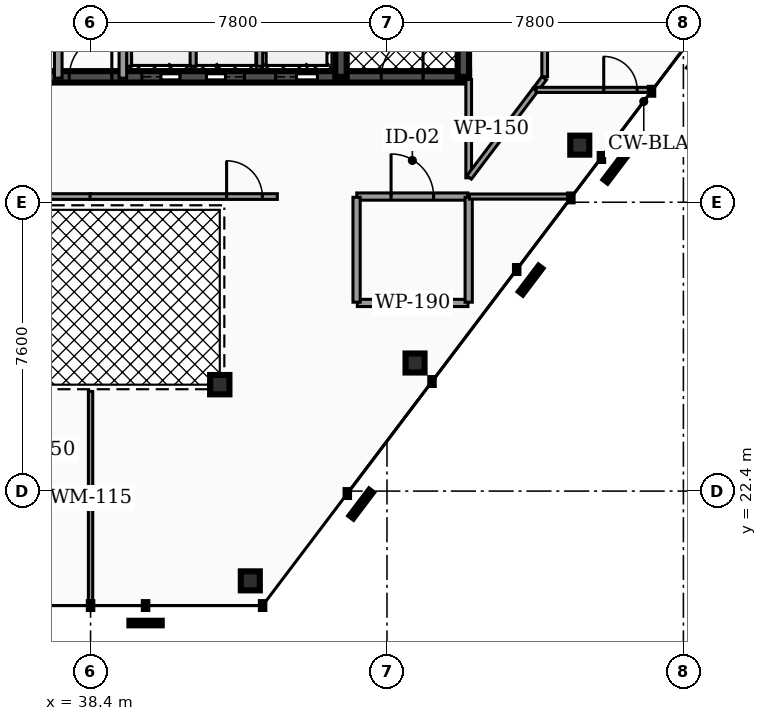
"""IFC4 building model, lengths in metres.
Left out: names, types, materials, properties, quantities, classifications, styles, units other than length and angle.
Written with IfcOpenShell. Run it as: python <this file> out.ifc"""

import sys

from ifc_helpers import new_model, si_unit, direction, frame, frame_2d, origin, origin_2d, place, context, subcontext, project, spatial, rectangle, hollow_rectangle, hollow_circle, extrude, element, fill, save


model = new_model("IFC4")
c1 = context("Model", 3, precision=1e-05, world=origin(), true_north=direction((0.0, 1.0)))
c2 = subcontext(c1, "Body", "Model", "MODEL_VIEW")
j1 = project(units=[si_unit("LENGTHUNIT", "METRE"), si_unit("PLANEANGLEUNIT", "RADIAN")], contexts=[c1])
p1 = place(None, origin())
s1 = spatial("IfcSite", under=j1, at=p1, CompositionType="ELEMENT")
p2 = place(p1, origin())
s2 = spatial("IfcBuilding", under=s1, at=p2, CompositionType="ELEMENT")
p3 = place(p2, frame((0.0, 0.0, 275.4)))
s3 = spatial("IfcBuildingStorey", under=s2, at=p3, CompositionType="ELEMENT", Elevation=275.4)
p4 = place(p3, frame((28.5, 33.3, 0.0), z_axis=(0.0, 0.0, 1.0), x_axis=(1.0, 0.0, 0.0)))
e1 = element("IfcWall", 1, at=p4, inside=s3, PredefinedType="SHEAR", context=c2, shape_type="SweptSolid", body=[
    extrude(rectangle(XDim=19.86, YDim=0.3, at=frame_2d((9.93, 0.0))), origin(), (0.0, 0.0, 1.0), 3.18),
])
p5 = place(p4, frame((3.93, 0.0, 0.0)))
e2 = element("IfcOpeningElement", 2, at=p5, cuts=e1, PredefinedType="OPENING", context=c2, shape_type="SweptSolid", body=[
    extrude(rectangle(XDim=1.1, YDim=2.15, at=frame_2d((0.55, 1.075))), frame((0.0, 0.16, 0.0), z_axis=(0.0, -1.0, 0.0), x_axis=(1.0, 0.0, 0.0)), (0.0, 0.0, 1.0), 0.32),
])
p6 = place(p4, frame((14.77, 0.0, 0.0)))
e3 = element("IfcOpeningElement", 3, at=p6, cuts=e1, PredefinedType="OPENING", context=c2, shape_type="SweptSolid", body=[
    extrude(rectangle(XDim=1.1, YDim=2.15, at=frame_2d((0.55, 1.075))), frame((0.0, 0.16, 0.0), z_axis=(0.0, -1.0, 0.0), x_axis=(1.0, 0.0, 0.0)), (0.0, 0.0, 1.0), 0.32),
])
p7 = place(p4, frame((11.25, 0.0, 0.0)))
e4 = element("IfcOpeningElement", 4, at=p7, cuts=e1, PredefinedType="OPENING", context=c2, shape_type="SweptSolid", body=[
    extrude(rectangle(XDim=1.0, YDim=2.1, at=frame_2d((0.5, 1.05))), frame((0.0, 0.16, 0.0), z_axis=(0.0, -1.0, 0.0), x_axis=(1.0, 0.0, 0.0)), (0.0, 0.0, 1.0), 0.32),
])
p8 = place(p4, frame((12.95, 0.0, 0.0)))
e5 = element("IfcOpeningElement", 5, at=p8, cuts=e1, PredefinedType="OPENING", context=c2, shape_type="SweptSolid", body=[
    extrude(rectangle(XDim=1.0, YDim=2.1, at=frame_2d((0.5, 1.05))), frame((0.0, 0.16, 0.0), z_axis=(0.0, -1.0, 0.0), x_axis=(1.0, 0.0, 0.0)), (0.0, 0.0, 1.0), 0.32),
])
p9 = place(p4, frame((5.85, 0.0, 0.0)))
e6 = element("IfcOpeningElement", 6, at=p9, cuts=e1, PredefinedType="OPENING", context=c2, shape_type="SweptSolid", body=[
    extrude(rectangle(XDim=1.0, YDim=2.1, at=frame_2d((0.5, 1.05))), frame((0.0, 0.16, 0.0), z_axis=(0.0, -1.0, 0.0), x_axis=(1.0, 0.0, 0.0)), (0.0, 0.0, 1.0), 0.32),
])
p10 = place(p4, frame((1.21, 0.0, 0.0)))
e7 = element("IfcOpeningElement", 7, at=p10, cuts=e1, PredefinedType="OPENING", context=c2, shape_type="SweptSolid", body=[
    extrude(rectangle(XDim=1.1, YDim=2.2, at=frame_2d((0.55, 1.1))), frame((0.0, 0.16, 0.0), z_axis=(0.0, -1.0, 0.0), x_axis=(1.0, 0.0, 0.0)), (0.0, 0.0, 1.0), 0.32),
])
p11 = place(p4, frame((9.34, 0.0, 0.0)))
e8 = element("IfcOpeningElement", 8, at=p11, cuts=e1, PredefinedType="OPENING", context=c2, shape_type="SweptSolid", body=[
    extrude(rectangle(XDim=1.12, YDim=2.05, at=frame_2d((0.56, 1.025))), frame((0.0, 0.16, 0.0), z_axis=(0.0, -1.0, 0.0), x_axis=(1.0, 0.0, 0.0)), (0.0, 0.0, 1.0), 0.32),
])
p12 = place(p4, frame((17.55, 0.0, 0.0)))
e9 = element("IfcOpeningElement", 9, at=p12, cuts=e1, PredefinedType="OPENING", context=c2, shape_type="SweptSolid", body=[
    extrude(rectangle(XDim=1.1, YDim=2.2, at=frame_2d((0.55, 1.1))), frame((0.0, 0.16, 0.0), z_axis=(0.0, -1.0, 0.0), x_axis=(1.0, 0.0, 0.0)), (0.0, 0.0, 1.0), 0.32),
])
for number, where, z_axis, x_axis in (
    (10, (44.99, 33.3, 0.0), (0.0, 0.0, 1.0), (0.0, 1.0, 0.0)),
    (11, (48.21, 33.3, 0.0), (0.0, 0.0, 1.0), (0.0, 1.0, 0.0)),
):
    element("IfcWall", number, at=place(p3, frame(where, z_axis=z_axis, x_axis=x_axis)), inside=s3, PredefinedType="SHEAR", context=c2, shape_type="SweptSolid", body=[
        extrude(rectangle(XDim=10.1, YDim=0.3, at=frame_2d((5.05, 0.0))), origin(), (0.0, 0.0, 1.0), 3.18),
    ])
p13 = place(p3, frame((42.604, 20.038, 0.0), z_axis=(-0.125139786352, 0.133215755676, 0.983154919792), x_axis=(-0.728854316653, -0.68466881417, 0.0)))
e12 = element("IfcColumn", 12, at=p13, inside=s3, PredefinedType="COLUMN", context=c2, shape_type="SweptSolid", body=[
    extrude(hollow_rectangle(XDim=0.5, YDim=0.5, WallThickness=0.025, at=origin_2d()), origin(), (0.0, 0.0, 1.0), 3.235),
])
p14 = place(p3, frame((46.938, 25.77, 0.0), z_axis=(-0.133126474894, 0.126032433715, 0.983052982974), x_axis=(-0.687493396244, -0.726190629326, 0.0)))
e13 = element("IfcColumn", 13, at=p14, inside=s3, PredefinedType="COLUMN", context=c2, shape_type="SweptSolid", body=[
    extrude(hollow_rectangle(XDim=0.5, YDim=0.5, WallThickness=0.025, at=origin_2d()), origin(), (0.0, 0.0, 1.0), 3.235),
])
p15 = place(p3, frame((51.273, 31.502, 0.0), z_axis=(-0.14102254439, 0.118763769326, 0.98285696267), x_axis=(-0.644160950514, -0.76488997237, 0.0)))
e14 = element("IfcColumn", 14, at=p15, inside=s3, PredefinedType="COLUMN", context=c2, shape_type="SweptSolid", body=[
    extrude(hollow_rectangle(XDim=0.5, YDim=0.5, WallThickness=0.025, at=origin_2d()), origin(), (0.0, 0.0, 1.0), 3.236),
])
p16 = place(p3, frame((41.8, 25.2, 0.0), z_axis=(0.0, 0.0, 1.0), x_axis=(1.0, 0.0, 0.0)))
e15 = element("IfcColumn", 15, at=p16, inside=s3, PredefinedType="COLUMN", context=c2, shape_type="SweptSolid", body=[
    extrude(hollow_circle(Radius=0.254, WallThickness=0.02, at=origin_2d()), origin(), (0.0, 0.0, 1.0), 3.18),
])
p17 = place(p3, frame((42.85, 33.58, 0.0), z_axis=(0.0, 0.0, 1.0), x_axis=(0.0, 1.0, 0.0)))
e16 = element("IfcWall", 16, at=p17, inside=s3, PredefinedType="SOLIDWALL", context=c2, shape_type="SweptSolid", body=[
    extrude(rectangle(XDim=2.45, YDim=0.16, at=frame_2d((1.225, 0.0))), origin(), (0.0, 0.0, 1.0), 3.18),
])
for number, where, z_axis, x_axis in (
    (17, (39.4, 33.58, 0.0), (0.0, 0.0, 1.0), (0.0, 1.0, 0.0)),
    (18, (41.1, 33.58, 0.0), (0.0, 0.0, 1.0), (0.0, 1.0, 0.0)),
):
    element("IfcWall", number, at=place(p3, frame(where, z_axis=z_axis, x_axis=x_axis)), inside=s3, PredefinedType="SOLIDWALL", context=c2, shape_type="SweptSolid", body=[
        extrude(rectangle(XDim=2.25, YDim=0.16, at=frame_2d((1.125, 0.0))), origin(), (0.0, 0.0, 1.0), 3.18),
    ])
p18 = place(p3, frame((37.55, 33.265, 0.0), z_axis=(0.0, 0.0, 1.0), x_axis=(0.0, 1.0, 0.0)))
e19 = element("IfcWall", 19, at=p18, inside=s3, PredefinedType="PARTITIONING", context=c2, shape_type="SweptSolid", body=[
    extrude(rectangle(XDim=3.615, YDim=0.2, at=frame_2d((1.808, 0.0))), origin(), (0.0, 0.0, 1.0), 2.235),
])
p19 = place(p18, frame((1.367, 0.0, 0.0)))
e20 = element("IfcOpeningElement", 20, at=p19, cuts=e19, PredefinedType="OPENING", context=c2, shape_type="SweptSolid", body=[
    extrude(rectangle(XDim=0.88, YDim=2.05, at=frame_2d((0.44, 1.025))), frame((0.0, 0.11, 0.0), z_axis=(0.0, -1.0, 0.0), x_axis=(1.0, 0.0, 0.0)), (0.0, 0.0, 1.0), 0.22),
])
p20 = place(p3, frame((39.25, 33.265, 0.0), z_axis=(0.0, 0.0, 1.0), x_axis=(0.0, 1.0, 0.0)))
e21 = element("IfcWall", 21, at=p20, inside=s3, PredefinedType="PARTITIONING", context=c2, shape_type="SweptSolid", body=[
    extrude(rectangle(XDim=3.615, YDim=0.2, at=frame_2d((1.808, 0.0))), origin(), (0.0, 0.0, 1.0), 2.235),
])
p21 = place(p3, frame((45.405, 30.15, 0.0), z_axis=(0.0, 0.0, 1.0), x_axis=(1.0, 0.0, 0.0)))
e22 = element("IfcWall", 22, at=p21, inside=s3, PredefinedType="PARTITIONING", context=c2, shape_type="SweptSolid", body=[
    extrude(rectangle(XDim=2.925, YDim=0.19, at=frame_2d((1.462, 0.0))), origin(), (0.0, 0.0, 1.0), 2.235),
])
p22 = place(p21, frame((0.903, 0.0, 0.0)))
e23 = element("IfcOpeningElement", 23, at=p22, cuts=e22, PredefinedType="OPENING", context=c2, shape_type="SweptSolid", body=[
    extrude(rectangle(XDim=1.12, YDim=2.05, at=frame_2d((0.56, 1.025))), frame((0.0, 0.105, 0.0), z_axis=(0.0, -1.0, 0.0), x_axis=(1.0, 0.0, 0.0)), (0.0, 0.0, 1.0), 0.21),
])
p23 = place(p3, frame((48.35, 30.643, 0.0), z_axis=(0.0, 0.0, 1.0), x_axis=(0.0, 1.0, 0.0)))
e24 = element("IfcWall", 24, at=p23, inside=s3, PredefinedType="PARTITIONING", context=c2, shape_type="SweptSolid", body=[
    extrude(rectangle(XDim=2.587, YDim=0.15, at=frame_2d((1.294, 0.0))), origin(), (0.0, 0.0, 1.0), 2.235),
])
p24 = place(p3, frame((33.485, 30.15, 0.0), z_axis=(0.0, 0.0, 1.0), x_axis=(1.0, 0.0, 0.0)))
e25 = element("IfcWall", 25, at=p24, inside=s3, PredefinedType="PARTITIONING", context=c2, shape_type="SweptSolid", body=[
    extrude(rectangle(XDim=4.93, YDim=0.15, at=frame_2d((2.465, 0.0))), origin(), (0.0, 0.0, 1.0), 2.235),
])
p25 = place(p24, frame((0.395, 0.0, 0.0)))
e26 = element("IfcOpeningElement", 26, at=p25, cuts=e25, PredefinedType="OPENING", context=c2, shape_type="SweptSolid", body=[
    extrude(rectangle(XDim=0.94, YDim=2.05, at=frame_2d((0.47, 1.025))), frame((0.0, 0.085, 0.0), z_axis=(0.0, -1.0, 0.0), x_axis=(1.0, 0.0, 0.0)), (0.0, 0.0, 1.0), 0.17),
])
p26 = place(p3, frame((38.385, 30.15, 0.0), z_axis=(0.0, 0.0, 1.0), x_axis=(1.0, 0.0, 0.0)))
e27 = element("IfcWall", 27, at=p26, inside=s3, PredefinedType="PARTITIONING", context=c2, shape_type="SweptSolid", body=[
    extrude(rectangle(XDim=4.93, YDim=0.15, at=frame_2d((2.465, 0.0))), origin(), (0.0, 0.0, 1.0), 2.235),
])
p27 = place(p26, frame((3.595, 0.0, 0.0)))
e28 = element("IfcOpeningElement", 28, at=p27, cuts=e27, PredefinedType="OPENING", context=c2, shape_type="SweptSolid", body=[
    extrude(rectangle(XDim=0.94, YDim=2.05, at=frame_2d((0.47, 1.025))), frame((0.0, 0.085, 0.0), z_axis=(0.0, -1.0, 0.0), x_axis=(1.0, 0.0, 0.0)), (0.0, 0.0, 1.0), 0.17),
])
p28 = place(p3, frame((45.42, 27.35, 0.0), z_axis=(0.0, 0.0, 1.0), x_axis=(1.0, 0.0, 0.0)))
e29 = element("IfcWall", 29, at=p28, inside=s3, PredefinedType="PARTITIONING", context=c2, shape_type="SweptSolid", body=[
    extrude(rectangle(XDim=2.91, YDim=0.19, at=frame_2d((1.455, 0.0))), origin(), (0.0, 0.0, 1.0), 2.235),
])
for number, where, z_axis, x_axis in (
    (30, (45.4, 27.37, 0.0), (0.0, 0.0, 1.0), (0.0, 1.0, 0.0)),
    (31, (48.35, 27.37, 0.0), (0.0, 0.0, 1.0), (0.0, 1.0, 0.0)),
):
    element("IfcWall", number, at=place(p3, frame(where, z_axis=z_axis, x_axis=x_axis)), inside=s3, PredefinedType="PARTITIONING", context=c2, shape_type="SweptSolid", body=[
        extrude(rectangle(XDim=2.76, YDim=0.19, at=frame_2d((1.38, 0.0))), origin(), (0.0, 0.0, 1.0), 2.235),
    ])
p29 = place(p3, frame((50.35, 33.302, 0.0), z_axis=(0.0, 0.0, 1.0), x_axis=(0.0, 1.0, 0.0)))
e32 = element("IfcWall", 32, at=p29, inside=s3, PredefinedType="PARTITIONING", context=c2, shape_type="SweptSolid", body=[
    extrude(rectangle(XDim=10.248, YDim=0.15, at=frame_2d((5.124, 0.0))), origin(), (0.0, 0.0, 1.0), 2.235),
])
p30 = place(p29, frame((4.654, 0.0, 0.0)))
e33 = element("IfcOpeningElement", 33, at=p30, cuts=e32, PredefinedType="OPENING", context=c2, shape_type="SweptSolid", body=[
    extrude(rectangle(XDim=0.94, YDim=2.05, at=frame_2d((0.47, 1.025))), frame((0.0, 0.085, 0.0), z_axis=(0.0, -1.0, 0.0), x_axis=(1.0, 0.0, 0.0)), (0.0, 0.0, 1.0), 0.17),
])
p31 = place(p3, frame((50.107, 32.96, 0.0), z_axis=(0.0, 0.0, 1.0), x_axis=(0.602950173728, 0.797778846549, 0.0)))
e34 = element("IfcWall", 34, at=p31, inside=s3, PredefinedType="PARTITIONING", context=c2, shape_type="SweptSolid", body=[
    extrude(rectangle(XDim=0.384, YDim=0.15, at=frame_2d((0.192, 0.0))), origin(), (0.0, 0.0, 1.0), 2.235),
])
p32 = place(p3, frame((48.362, 30.654, 0.0), z_axis=(0.0, 0.0, 1.0), x_axis=(0.603189668488, 0.79759778324, 0.0)))
e35 = element("IfcWall", 35, at=p32, inside=s3, PredefinedType="PARTITIONING", context=c2, shape_type="SweptSolid", body=[
    extrude(rectangle(XDim=2.886, YDim=0.15, at=frame_2d((1.443, 0.0))), origin(), (0.0, 0.0, 1.0), 2.235),
])
p33 = place(p3, frame((38.4, 19.403, 0.0), z_axis=(0.0, 0.0, 1.0), x_axis=(0.0, 1.0, 0.0)))
e36 = element("IfcWall", 36, at=p33, inside=s3, PredefinedType="MOVABLE", context=c2, shape_type="SweptSolid", body=[
    extrude(rectangle(XDim=5.617, YDim=0.115, at=frame_2d((2.809, 0.0))), origin(), (0.0, 0.0, 1.0), 2.235),
])
p34 = place(p3, frame((48.37, 30.15, 0.0), z_axis=(0.0, 0.0, 1.0), x_axis=(1.0, 0.0, 0.0)))
e37 = element("IfcWall", 37, at=p34, inside=s3, PredefinedType="PARTITIONING", context=c2, shape_type="SweptSolid", body=[
    extrude(rectangle(XDim=2.68, YDim=0.135, at=frame_2d((1.34, 0.0))), origin(), (0.0, 0.0, 1.0), 2.235),
])
p35 = place(p3, frame((50.124, 32.956, 0.0), z_axis=(0.0, 0.0, 1.0), x_axis=(1.0, 0.0, 0.0)))
e38 = element("IfcWall", 38, at=p35, inside=s3, PredefinedType="PARTITIONING", context=c2, shape_type="SweptSolid", body=[
    extrude(rectangle(XDim=3.049, YDim=0.135, at=frame_2d((1.525, 0.0))), origin(), (0.0, 0.0, 1.0), 2.235),
])
p36 = place(p35, frame((1.78, 0.0, 0.0)))
e39 = element("IfcOpeningElement", 39, at=p36, cuts=e38, PredefinedType="OPENING", context=c2, shape_type="SweptSolid", body=[
    extrude(rectangle(XDim=0.88, YDim=2.05, at=frame_2d((0.44, 1.025))), frame((0.0, 0.077, 0.0), z_axis=(0.0, -1.0, 0.0), x_axis=(1.0, 0.0, 0.0)), (0.0, 0.0, 1.0), 0.155),
])
p37 = place(p6, origin())
e40 = element("IfcDoor", 40, at=p37, inside=s3, OperationType="SLIDING_TO_RIGHT", PredefinedType="DOOR", context=c2, shape_type="SweptSolid", body=[
    extrude(rectangle(XDim=1.1, YDim=2.15, at=frame_2d((0.55, 1.075))), frame((0.0, 0.025, 0.0), z_axis=(0.0, -1.0, 0.0), x_axis=(1.0, 0.0, 0.0)), (0.0, 0.0, 1.0), 0.05),
])
fill(e3, e40)
p38 = place(p7, origin())
e41 = element("IfcDoor", 41, at=p38, inside=s3, OperationType="SLIDING_TO_RIGHT", PredefinedType="DOOR", context=c2, shape_type="SweptSolid", body=[
    extrude(rectangle(XDim=1.0, YDim=2.1, at=frame_2d((0.5, 1.05))), frame((0.0, 0.025, 0.0), z_axis=(0.0, -1.0, 0.0), x_axis=(1.0, 0.0, 0.0)), (0.0, 0.0, 1.0), 0.05),
])
fill(e4, e41)
p39 = place(p8, origin())
e42 = element("IfcDoor", 42, at=p39, inside=s3, OperationType="SLIDING_TO_LEFT", PredefinedType="DOOR", context=c2, shape_type="SweptSolid", body=[
    extrude(rectangle(XDim=1.0, YDim=2.1, at=frame_2d((0.5, 1.05))), frame((0.0, 0.025, 0.0), z_axis=(0.0, -1.0, 0.0), x_axis=(1.0, 0.0, 0.0)), (0.0, 0.0, 1.0), 0.05),
])
fill(e5, e42)
p40 = place(p11, origin())
e43 = element("IfcDoor", 43, at=p40, inside=s3, OperationType="SINGLE_SWING_RIGHT", PredefinedType="DOOR", context=c2, shape_type="SweptSolid", body=[
    extrude(rectangle(XDim=1.12, YDim=2.05, at=frame_2d((0.56, 1.025))), frame((0.0, 0.025, 0.0), z_axis=(0.0, -1.0, 0.0), x_axis=(1.0, 0.0, 0.0)), (0.0, 0.0, 1.0), 0.05),
])
fill(e8, e43)
p41 = place(p12, origin())
e44 = element("IfcDoor", 44, at=p41, inside=s3, OperationType="SINGLE_SWING_RIGHT", PredefinedType="DOOR", context=c2, shape_type="SweptSolid", body=[
    extrude(rectangle(XDim=1.1, YDim=2.2, at=frame_2d((0.55, 1.1))), frame((0.0, 0.025, 0.0), z_axis=(0.0, -1.0, 0.0), x_axis=(1.0, 0.0, 0.0)), (0.0, 0.0, 1.0), 0.05),
])
fill(e9, e44)
p42 = place(p22, origin())
e45 = element("IfcDoor", 45, at=p42, inside=s3, OperationType="SINGLE_SWING_LEFT", PredefinedType="DOOR", context=c2, shape_type="SweptSolid", body=[
    extrude(rectangle(XDim=1.12, YDim=2.05, at=frame_2d((0.56, 1.025))), frame((0.0, 0.025, 0.0), z_axis=(0.0, -1.0, 0.0), x_axis=(1.0, 0.0, 0.0)), (0.0, 0.0, 1.0), 0.05),
])
fill(e23, e45)
p43 = place(p27, origin())
e46 = element("IfcDoor", 46, at=p43, inside=s3, OperationType="SINGLE_SWING_LEFT", PredefinedType="DOOR", context=c2, shape_type="SweptSolid", body=[
    extrude(rectangle(XDim=0.94, YDim=2.05, at=frame_2d((0.47, 1.025))), frame((0.0, 0.025, 0.0), z_axis=(0.0, -1.0, 0.0), x_axis=(1.0, 0.0, 0.0)), (0.0, 0.0, 1.0), 0.05),
])
fill(e28, e46)
p44 = place(p36, origin())
e47 = element("IfcDoor", 47, at=p44, inside=s3, OperationType="SINGLE_SWING_LEFT", PredefinedType="DOOR", context=c2, shape_type="SweptSolid", body=[
    extrude(rectangle(XDim=0.88, YDim=2.05, at=frame_2d((0.44, 1.025))), frame((0.0, 0.025, 0.0), z_axis=(0.0, -1.0, 0.0), x_axis=(1.0, 0.0, 0.0)), (0.0, 0.0, 1.0), 0.05),
])
fill(e39, e47)
save(model, sys.argv[1])
